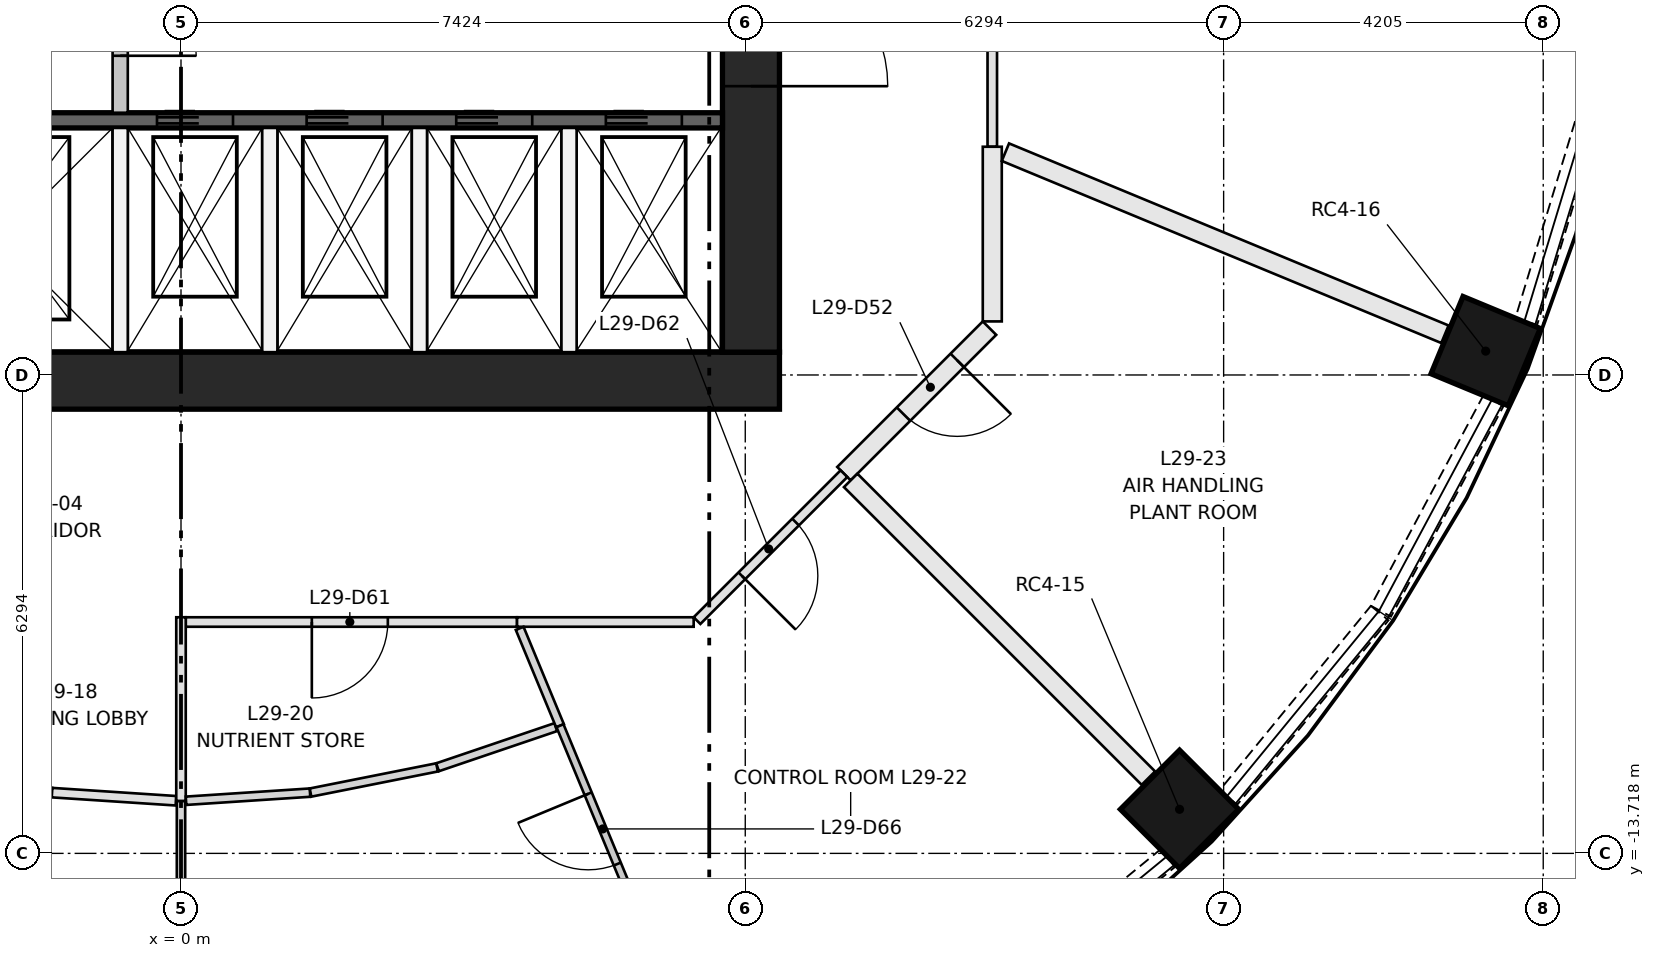
"""IFC4 building model, lengths in metres.
Left out: names, types, materials, properties, quantities, classifications, styles, units other than length and angle.
Written with IfcOpenShell. Run it as: python <this file> out.ifc"""

import sys

from ifc_helpers import new_model, si_unit, direction, frame, frame_2d, origin, origin_2d, place, context, subcontext, project, spatial, rectangle, extrude, element, fill, save


model = new_model("IFC4")
c1 = context("Model", 3, precision=1e-05, world=origin(), true_north=direction((0.0, 1.0)))
c2 = subcontext(c1, "Body", "Model", "MODEL_VIEW")
j1 = project(units=[si_unit("LENGTHUNIT", "METRE"), si_unit("PLANEANGLEUNIT", "RADIAN")], contexts=[c1])
p1 = place(None, origin())
s1 = spatial("IfcSite", under=j1, at=p1, CompositionType="ELEMENT")
p2 = place(p1, origin())
s2 = spatial("IfcBuilding", under=s1, at=p2, CompositionType="ELEMENT")
p3 = place(p2, frame((0.0, 0.0, 112.9)))
s3 = spatial("IfcBuildingStorey", under=s2, at=p3, CompositionType="ELEMENT", Elevation=112.9)
for number, where, z_axis, x_axis in (
    (1, (13.138, -13.138, 0.0), (0.0, 0.0, 1.0), (0.707, -0.707, 0.0)),
    (2, (17.166, -7.11, 0.0), (0.0, 0.0, 1.0), (0.924, -0.383, 0.0)),
):
    element("IfcColumn", number, at=place(p3, frame(where, z_axis=z_axis, x_axis=x_axis)), inside=s3, PredefinedType="COLUMN", context=c2, shape_type="SweptSolid", body=[
        extrude(rectangle(XDim=1.1, YDim=1.1, at=origin_2d()), origin(), (0.0, 0.0, 1.0), 3.65),
    ])
p4 = place(p3, frame((-7.874, -7.499, 0.0), z_axis=(0.0, 0.0, 1.0), x_axis=(1.0, 0.0, 0.0)))
e3 = element("IfcWall", 3, at=p4, inside=s3, PredefinedType="SHEAR", context=c2, shape_type="SweptSolid", body=[
    extrude(rectangle(XDim=15.748, YDim=0.75, at=frame_2d((7.874, 0.0))), origin(), (0.0, 0.0, 1.0), 3.65),
])
p5 = place(p3, frame((7.499, -7.124, 0.0), z_axis=(0.0, 0.0, 1.0), x_axis=(0.0, 1.0, 0.0)))
e4 = element("IfcWall", 4, at=p5, inside=s3, PredefinedType="SHEAR", context=c2, shape_type="SweptSolid", body=[
    extrude(rectangle(XDim=14.248, YDim=0.75, at=frame_2d((7.124, 0.0))), origin(), (0.0, 0.0, 1.0), 3.65),
])
p6 = place(p5, frame((6.624, 0.0, 0.0)))
e5 = element("IfcOpeningElement", 5, at=p6, cuts=e4, PredefinedType="OPENING", context=c2, shape_type="SweptSolid", body=[
    extrude(rectangle(XDim=1.0, YDim=2.1, at=frame_2d((0.5, 1.05))), frame((0.0, 0.385, 0.0), z_axis=(0.0, -1.0, 0.0), x_axis=(1.0, 0.0, 0.0)), (0.0, 0.0, 1.0), 0.77),
])
p7 = place(p5, frame((3.5, 0.0, 0.0)))
e6 = element("IfcOpeningElement", 6, at=p7, cuts=e4, PredefinedType="OPENING", context=c2, shape_type="SweptSolid", body=[
    extrude(rectangle(XDim=1.8, YDim=2.1, at=frame_2d((0.9, 1.05))), frame((0.0, 0.385, 0.0), z_axis=(0.0, -1.0, 0.0), x_axis=(1.0, 0.0, 0.0)), (0.0, 0.0, 1.0), 0.77),
])
p8 = place(p5, frame((8.948, 0.0, 0.0)))
e7 = element("IfcOpeningElement", 7, at=p8, cuts=e4, PredefinedType="OPENING", context=c2, shape_type="SweptSolid", body=[
    extrude(rectangle(XDim=1.8, YDim=2.1, at=frame_2d((0.9, 1.05))), frame((0.0, 0.385, 0.0), z_axis=(0.0, -1.0, 0.0), x_axis=(1.0, 0.0, 0.0)), (0.0, 0.0, 1.0), 0.77),
])
p9 = place(p3, frame((-7.124, -4.074, 0.0), z_axis=(0.0, 0.0, 1.0), x_axis=(1.0, 0.0, 0.0)))
e8 = element("IfcWall", 8, at=p9, inside=s3, PredefinedType="SHEAR", context=c2, shape_type="SweptSolid", body=[
    extrude(rectangle(XDim=14.248, YDim=0.2, at=frame_2d((7.124, 0.0))), origin(), (0.0, 0.0, 1.0), 3.3),
])
p10 = place(p9, frame((1.069, 0.0, 0.0)))
e9 = element("IfcOpeningElement", 9, at=p10, cuts=e8, PredefinedType="OPENING", context=c2, shape_type="SweptSolid", body=[
    extrude(rectangle(XDim=1.1, YDim=2.1, at=frame_2d((0.55, 1.05))), frame((0.0, 0.11, 0.0), z_axis=(0.0, -1.0, 0.0), x_axis=(1.0, 0.0, 0.0)), (0.0, 0.0, 1.0), 0.22),
])
p11 = place(p9, frame((4.206, 0.0, 0.0)))
e10 = element("IfcOpeningElement", 10, at=p11, cuts=e8, PredefinedType="OPENING", context=c2, shape_type="SweptSolid", body=[
    extrude(rectangle(XDim=1.1, YDim=2.1, at=frame_2d((0.55, 1.05))), frame((0.0, 0.11, 0.0), z_axis=(0.0, -1.0, 0.0), x_axis=(1.0, 0.0, 0.0)), (0.0, 0.0, 1.0), 0.22),
])
p12 = place(p9, frame((6.808, 0.0, 0.0)))
e11 = element("IfcOpeningElement", 11, at=p12, cuts=e8, PredefinedType="OPENING", context=c2, shape_type="SweptSolid", body=[
    extrude(rectangle(XDim=1.0, YDim=2.1, at=frame_2d((0.5, 1.05))), frame((0.0, 0.11, 0.0), z_axis=(0.0, -1.0, 0.0), x_axis=(1.0, 0.0, 0.0)), (0.0, 0.0, 1.0), 0.22),
])
p13 = place(p9, frame((8.777, 0.0, 0.0)))
e12 = element("IfcOpeningElement", 12, at=p13, cuts=e8, PredefinedType="OPENING", context=c2, shape_type="SweptSolid", body=[
    extrude(rectangle(XDim=1.0, YDim=2.1, at=frame_2d((0.5, 1.05))), frame((0.0, 0.11, 0.0), z_axis=(0.0, -1.0, 0.0), x_axis=(1.0, 0.0, 0.0)), (0.0, 0.0, 1.0), 0.22),
])
p14 = place(p9, frame((10.745, 0.0, 0.0)))
e13 = element("IfcOpeningElement", 13, at=p14, cuts=e8, PredefinedType="OPENING", context=c2, shape_type="SweptSolid", body=[
    extrude(rectangle(XDim=1.0, YDim=2.1, at=frame_2d((0.5, 1.05))), frame((0.0, 0.11, 0.0), z_axis=(0.0, -1.0, 0.0), x_axis=(1.0, 0.0, 0.0)), (0.0, 0.0, 1.0), 0.22),
])
p15 = place(p9, frame((12.714, 0.0, 0.0)))
e14 = element("IfcOpeningElement", 14, at=p15, cuts=e8, PredefinedType="OPENING", context=c2, shape_type="SweptSolid", body=[
    extrude(rectangle(XDim=1.0, YDim=2.1, at=frame_2d((0.5, 1.05))), frame((0.0, 0.11, 0.0), z_axis=(0.0, -1.0, 0.0), x_axis=(1.0, 0.0, 0.0)), (0.0, 0.0, 1.0), 0.22),
])
p16 = place(p3, frame((-0.8, -7.124, 0.0), z_axis=(0.0, 0.0, 1.0), x_axis=(0.0, 1.0, 0.0)))
e15 = element("IfcWall", 15, at=p16, inside=s3, PredefinedType="PARTITIONING", context=c2, shape_type="SweptSolid", body=[
    extrude(rectangle(XDim=2.95, YDim=0.2, at=frame_2d((1.475, 0.0))), origin(), (0.0, 0.0, 1.0), 3.3),
])
p17 = place(p3, frame((-0.8, -3.974, 0.0), z_axis=(0.0, 0.0, 1.0), x_axis=(0.0, 1.0, 0.0)))
e16 = element("IfcWall", 16, at=p17, inside=s3, PredefinedType="PARTITIONING", context=c2, shape_type="SweptSolid", body=[
    extrude(rectangle(XDim=2.499, YDim=0.2, at=frame_2d((1.25, 0.0))), origin(), (0.0, 0.0, 1.0), 3.3),
])
p18 = place(p17, frame((0.75, 0.0, 0.0)))
e17 = element("IfcOpeningElement", 17, at=p18, cuts=e16, PredefinedType="OPENING", context=c2, shape_type="SweptSolid", body=[
    extrude(rectangle(XDim=1.0, YDim=2.1, at=frame_2d((0.5, 1.05))), frame((0.0, 0.11, 0.0), z_axis=(0.0, -1.0, 0.0), x_axis=(1.0, 0.0, 0.0)), (0.0, 0.0, 1.0), 0.22),
])
for number, where, z_axis, x_axis in (
    (18, (1.168, -7.124, 0.0), (0.0, 0.0, 1.0), (0.0, 1.0, 0.0)),
    (19, (3.137, -7.124, 0.0), (0.0, 0.0, 1.0), (0.0, 1.0, 0.0)),
    (20, (5.105, -7.124, 0.0), (0.0, 0.0, 1.0), (0.0, 1.0, 0.0)),
):
    element("IfcWall", number, at=place(p3, frame(where, z_axis=z_axis, x_axis=x_axis)), inside=s3, PredefinedType="PARTITIONING", context=c2, shape_type="SweptSolid", body=[
        extrude(rectangle(XDim=2.95, YDim=0.2, at=frame_2d((1.475, 0.0))), origin(), (0.0, 0.0, 1.0), 3.3),
    ])
for number, where, z_axis, x_axis in (
    (21, (10.557, -15.771, 0.0), (0.0, 0.0, 1.0), (0.773, 0.634, 0.0)),
    (22, (13.781, -12.983, 0.0), (0.0, 0.0, 1.0), (0.634, 0.773, 0.0)),
):
    element("IfcWall", number, at=place(p3, frame(where, z_axis=z_axis, x_axis=x_axis)), inside=s3, PredefinedType="SOLIDWALL", context=c2, shape_type="SweptSolid", body=[
        extrude(rectangle(XDim=3.139, YDim=0.3, at=frame_2d((1.569, 0.0))), origin(), (0.0, 0.0, 1.0), 0.9),
    ])
p19 = place(p3, frame((15.788, -10.532, 0.0), z_axis=(0.0, 0.0, 1.0), x_axis=(0.471375185282, 0.88193278355, 0.0)))
e23 = element("IfcWall", 23, at=p19, inside=s3, PredefinedType="SOLIDWALL", context=c2, shape_type="SweptSolid", body=[
    extrude(rectangle(XDim=3.139, YDim=0.3, at=frame_2d((1.57, 0.0))), origin(), (0.0, 0.0, 1.0), 0.9),
])
p20 = place(p3, frame((17.699, -6.722, 0.0), z_axis=(0.0, 0.0, 1.0), x_axis=(0.290214584271, 0.956961595403, 0.0)))
e24 = element("IfcWall", 24, at=p20, inside=s3, PredefinedType="SOLIDWALL", context=c2, shape_type="SweptSolid", body=[
    extrude(rectangle(XDim=3.139, YDim=0.3, at=frame_2d((1.57, 0.0))), origin(), (0.0, 0.0, 1.0), 0.9),
])
p21 = place(p3, frame((10.674, 4.421, 0.0), z_axis=(0.0, 0.0, 1.0), x_axis=(0.0, -1.0, 0.0)))
e25 = element("IfcWall", 25, at=p21, inside=s3, PredefinedType="PARTITIONING", context=c2, shape_type="SweptSolid", body=[
    extrude(rectangle(XDim=8.843, YDim=0.125, at=frame_2d((4.421, 0.0))), origin(), (0.0, 0.0, 1.0), 3.3),
])
p22 = place(p21, frame((3.5, 0.0, 0.0)))
e26 = element("IfcOpeningElement", 26, at=p22, cuts=e25, PredefinedType="OPENING", context=c2, shape_type="SweptSolid", body=[
    extrude(rectangle(XDim=1.8, YDim=2.1, at=frame_2d((0.9, 1.05))), frame((0.0, 0.073, 0.0), z_axis=(0.0, -1.0, 0.0), x_axis=(1.0, 0.0, 0.0)), (0.0, 0.0, 1.0), 0.145),
])
p23 = place(p3, frame((10.637, -6.808, 0.0), z_axis=(0.0, 0.0, 1.0), x_axis=(-0.707151855722, -0.707061703777, 0.0)))
e27 = element("IfcWall", 27, at=p23, inside=s3, PredefinedType="PARTITIONING", context=c2, shape_type="SweptSolid", body=[
    extrude(rectangle(XDim=2.708, YDim=0.25, at=frame_2d((1.354, 0.0))), origin(), (0.0, 0.0, 1.0), 3.3),
])
p24 = place(p23, frame((0.6, 0.0, 0.0)))
e28 = element("IfcOpeningElement", 28, at=p24, cuts=e27, PredefinedType="OPENING", context=c2, shape_type="SweptSolid", body=[
    extrude(rectangle(XDim=1.0, YDim=2.1, at=frame_2d((0.5, 1.05))), frame((0.0, 0.135, 0.0), z_axis=(0.0, -1.0, 0.0), x_axis=(1.0, 0.0, 0.0)), (0.0, 0.0, 1.0), 0.27),
])
p25 = place(p3, frame((10.674, -4.421, 0.0), z_axis=(0.0, 0.0, 1.0), x_axis=(0.0, -1.0, 0.0)))
e29 = element("IfcWall", 29, at=p25, inside=s3, PredefinedType="PARTITIONING", context=c2, shape_type="SweptSolid", body=[
    extrude(rectangle(XDim=2.298, YDim=0.25, at=frame_2d((1.149, 0.0))), origin(), (0.0, 0.0, 1.0), 3.3),
])
p26 = place(p3, frame((4.421, -10.674, 0.0), z_axis=(0.0, 0.0, 1.0), x_axis=(-1.0, 0.0, 0.0)))
e30 = element("IfcWall", 30, at=p26, inside=s3, PredefinedType="PARTITIONING", context=c2, shape_type="SweptSolid", body=[
    extrude(rectangle(XDim=4.359, YDim=0.125, at=frame_2d((2.179, 0.0))), origin(), (0.0, 0.0, 1.0), 3.3),
])
p27 = place(p26, frame((1.7, 0.0, 0.0)))
e31 = element("IfcOpeningElement", 31, at=p27, cuts=e30, PredefinedType="OPENING", context=c2, shape_type="SweptSolid", body=[
    extrude(rectangle(XDim=1.0, YDim=2.1, at=frame_2d((0.5, 1.05))), frame((0.0, 0.073, 0.0), z_axis=(0.0, -1.0, 0.0), x_axis=(1.0, 0.0, 0.0)), (0.0, 0.0, 1.0), 0.145),
])
p28 = place(p3, frame((6.745, -10.674, 0.0), z_axis=(0.0, 0.0, 1.0), x_axis=(-1.0, 0.0, 0.0)))
e32 = element("IfcWall", 32, at=p28, inside=s3, PredefinedType="PARTITIONING", context=c2, shape_type="SweptSolid", body=[
    extrude(rectangle(XDim=2.324, YDim=0.125, at=frame_2d((1.162, 0.0))), origin(), (0.0, 0.0, 1.0), 3.3),
])
p29 = place(p3, frame((8.722, -8.722, 0.0), z_axis=(0.0, 0.0, 1.0), x_axis=(-0.707062130741, -0.707151428813, 0.0)))
e33 = element("IfcWall", 33, at=p29, inside=s3, PredefinedType="PARTITIONING", context=c2, shape_type="SweptSolid", body=[
    extrude(rectangle(XDim=2.734, YDim=0.125, at=frame_2d((1.367, 0.0))), origin(), (0.0, 0.0, 1.0), 3.3),
])
p30 = place(p29, frame((0.9, 0.0, 0.0)))
e34 = element("IfcOpeningElement", 34, at=p30, cuts=e33, PredefinedType="OPENING", context=c2, shape_type="SweptSolid", body=[
    extrude(rectangle(XDim=1.0, YDim=2.1, at=frame_2d((0.5, 1.05))), frame((0.0, 0.073, 0.0), z_axis=(0.0, -1.0, 0.0), x_axis=(1.0, 0.0, 0.0)), (0.0, 0.0, 1.0), 0.145),
])
p31 = place(p3, frame((16.63, -6.888, 0.0), z_axis=(0.0, 0.0, 1.0), x_axis=(-0.923891816603, 0.382653774599, 0.0)))
e35 = element("IfcWall", 35, at=p31, inside=s3, PredefinedType="PARTITIONING", context=c2, shape_type="SweptSolid", body=[
    extrude(rectangle(XDim=6.26, YDim=0.25, at=frame_2d((3.13, 0.0))), origin(), (0.0, 0.0, 1.0), 3.3),
])
p32 = place(p3, frame((-1.705, -12.918, 0.0), z_axis=(0.0, 0.0, 1.0), x_axis=(-0.980795988991, 0.195036478586, 0.0)))
e36 = element("IfcWall", 36, at=p32, inside=s3, PredefinedType="PARTITIONING", context=c2, shape_type="SweptSolid", body=[
    extrude(rectangle(XDim=1.696, YDim=0.125, at=frame_2d((0.848, 0.0))), origin(), (0.0, 0.0, 1.0), 3.3),
])
p33 = place(p32, frame((0.3, 0.0, 0.0)))
e37 = element("IfcOpeningElement", 37, at=p33, cuts=e36, PredefinedType="OPENING", context=c2, shape_type="SweptSolid", body=[
    extrude(rectangle(XDim=1.0, YDim=2.1, at=frame_2d((0.5, 1.05))), frame((0.0, 0.073, 0.0), z_axis=(0.0, -1.0, 0.0), x_axis=(1.0, 0.0, 0.0)), (0.0, 0.0, 1.0), 0.145),
])
p34 = place(p3, frame((-0.067, -13.026, 0.0), z_axis=(0.0, 0.0, 1.0), x_axis=(-0.997855349109, 0.065457637099, 0.0)))
e38 = element("IfcWall", 38, at=p34, inside=s3, PredefinedType="PARTITIONING", context=c2, shape_type="SweptSolid", body=[
    extrude(rectangle(XDim=1.634, YDim=0.125, at=frame_2d((0.817, 0.0))), origin(), (0.0, 0.0, 1.0), 3.3),
])
p35 = place(p3, frame((0.0, -10.612, 0.0), z_axis=(0.0, 0.0, 1.0), x_axis=(0.0, -1.0, 0.0)))
e39 = element("IfcWall", 39, at=p35, inside=s3, PredefinedType="PARTITIONING", context=c2, shape_type="SweptSolid", body=[
    extrude(rectangle(XDim=2.418, YDim=0.125, at=frame_2d((1.209, 0.0))), origin(), (0.0, 0.0, 1.0), 3.3),
])
p36 = place(p3, frame((0.0, -13.03, 0.0), z_axis=(0.0, 0.0, 1.0), x_axis=(0.0, -1.0, 0.0)))
e40 = element("IfcWall", 40, at=p36, inside=s3, PredefinedType="PARTITIONING", context=c2, shape_type="SweptSolid", body=[
    extrude(rectangle(XDim=4.97, YDim=0.11, at=frame_2d((2.485, 0.0))), origin(), (0.0, 0.0, 1.0), 3.3),
])
p37 = place(p3, frame((1.697, -12.919, 0.0), z_axis=(0.0, 0.0, 1.0), x_axis=(-0.997857908157, -0.065418614545, 0.0)))
e41 = element("IfcWall", 41, at=p37, inside=s3, PredefinedType="PARTITIONING", context=c2, shape_type="SweptSolid", body=[
    extrude(rectangle(XDim=1.635, YDim=0.11, at=frame_2d((0.817, 0.0))), origin(), (0.0, 0.0, 1.0), 3.3),
])
p38 = place(p3, frame((3.369, -12.587, 0.0), z_axis=(0.0, 0.0, 1.0), x_axis=(-0.980790359024, -0.19506478833, 0.0)))
e42 = element("IfcWall", 42, at=p38, inside=s3, PredefinedType="PARTITIONING", context=c2, shape_type="SweptSolid", body=[
    extrude(rectangle(XDim=1.697, YDim=0.11, at=frame_2d((0.849, 0.0))), origin(), (0.0, 0.0, 1.0), 3.3),
])
p39 = place(p3, frame((4.931, -12.057, 0.0), z_axis=(0.0, 0.0, 1.0), x_axis=(-0.946990007889, -0.321263015235, 0.0)))
e43 = element("IfcWall", 43, at=p39, inside=s3, PredefinedType="PARTITIONING", context=c2, shape_type="SweptSolid", body=[
    extrude(rectangle(XDim=1.642, YDim=0.11, at=frame_2d((0.821, 0.0))), origin(), (0.0, 0.0, 1.0), 3.3),
])
p40 = place(p3, frame((4.456, -10.758, 0.0), z_axis=(0.0, 0.0, 1.0), x_axis=(0.382751066095, -0.923851514803, 0.0)))
e44 = element("IfcWall", 44, at=p40, inside=s3, PredefinedType="PARTITIONING", context=c2, shape_type="SweptSolid", body=[
    extrude(rectangle(XDim=1.386, YDim=0.11, at=frame_2d((0.693, 0.0))), origin(), (0.0, 0.0, 1.0), 3.3),
])
p41 = place(p3, frame((6.888, -16.63, 0.0), z_axis=(0.0, 0.0, 1.0), x_axis=(-0.38266126553, 0.923888714003, 0.0)))
e45 = element("IfcWall", 45, at=p41, inside=s3, PredefinedType="PARTITIONING", context=c2, shape_type="SweptSolid", body=[
    extrude(rectangle(XDim=4.97, YDim=0.1, at=frame_2d((2.485, 0.0))), origin(), (0.0, 0.0, 1.0), 3.3),
])
p42 = place(p41, frame((3.0, 0.0, 0.0)))
e46 = element("IfcOpeningElement", 46, at=p42, cuts=e45, PredefinedType="OPENING", context=c2, shape_type="SweptSolid", body=[
    extrude(rectangle(XDim=1.0, YDim=2.1, at=frame_2d((0.5, 1.05))), frame((0.0, 0.06, 0.0), z_axis=(0.0, -1.0, 0.0), x_axis=(1.0, 0.0, 0.0)), (0.0, 0.0, 1.0), 0.12),
])
p43 = place(p3, frame((8.811, -8.811, 0.0), z_axis=(0.0, 0.0, 1.0), x_axis=(0.707106781187, -0.707106781187, 0.0)))
e47 = element("IfcWall", 47, at=p43, inside=s3, PredefinedType="PARTITIONING", context=c2, shape_type="SweptSolid", body=[
    extrude(rectangle(XDim=5.54, YDim=0.25, at=frame_2d((2.77, 0.0))), origin(), (0.0, 0.0, 1.0), 3.3),
])
p44 = place(p12, origin())
e48 = element("IfcDoor", 48, at=p44, inside=s3, OperationType="DOUBLE_DOOR_SLIDING", PredefinedType="DOOR", context=c2, shape_type="SweptSolid", body=[
    extrude(rectangle(XDim=1.0, YDim=2.1, at=frame_2d((0.5, 1.05))), frame((0.0, 0.025, 0.0), z_axis=(0.0, -1.0, 0.0), x_axis=(1.0, 0.0, 0.0)), (0.0, 0.0, 1.0), 0.05),
])
fill(e11, e48)
p45 = place(p13, origin())
e49 = element("IfcDoor", 49, at=p45, inside=s3, OperationType="DOUBLE_DOOR_SLIDING", PredefinedType="DOOR", context=c2, shape_type="SweptSolid", body=[
    extrude(rectangle(XDim=1.0, YDim=2.1, at=frame_2d((0.5, 1.05))), frame((0.0, 0.025, 0.0), z_axis=(0.0, -1.0, 0.0), x_axis=(1.0, 0.0, 0.0)), (0.0, 0.0, 1.0), 0.05),
])
fill(e12, e49)
p46 = place(p14, origin())
e50 = element("IfcDoor", 50, at=p46, inside=s3, OperationType="DOUBLE_DOOR_SLIDING", PredefinedType="DOOR", context=c2, shape_type="SweptSolid", body=[
    extrude(rectangle(XDim=1.0, YDim=2.1, at=frame_2d((0.5, 1.05))), frame((0.0, 0.025, 0.0), z_axis=(0.0, -1.0, 0.0), x_axis=(1.0, 0.0, 0.0)), (0.0, 0.0, 1.0), 0.05),
])
fill(e13, e50)
p47 = place(p15, origin())
e51 = element("IfcDoor", 51, at=p47, inside=s3, OperationType="DOUBLE_DOOR_SLIDING", PredefinedType="DOOR", context=c2, shape_type="SweptSolid", body=[
    extrude(rectangle(XDim=1.0, YDim=2.1, at=frame_2d((0.5, 1.05))), frame((0.0, 0.025, 0.0), z_axis=(0.0, -1.0, 0.0), x_axis=(1.0, 0.0, 0.0)), (0.0, 0.0, 1.0), 0.05),
])
fill(e14, e51)
p48 = place(p18, frame((1.0, 0.0, 0.0), z_axis=(0.0, 0.0, 1.0), x_axis=(-1.0, 0.0, 0.0)))
e52 = element("IfcDoor", 52, at=p48, inside=s3, OperationType="SINGLE_SWING_LEFT", PredefinedType="DOOR", context=c2, shape_type="SweptSolid", body=[
    extrude(rectangle(XDim=1.0, YDim=2.1, at=frame_2d((0.5, 1.05))), frame((0.0, 0.025, 0.0), z_axis=(0.0, -1.0, 0.0), x_axis=(1.0, 0.0, 0.0)), (0.0, 0.0, 1.0), 0.05),
])
fill(e17, e52)
p49 = place(p7, frame((1.8, 0.0, 0.0), z_axis=(0.0, 0.0, 1.0), x_axis=(-1.0, 0.0, 0.0)))
e53 = element("IfcDoor", 53, at=p49, inside=s3, OperationType="DOUBLE_DOOR_SINGLE_SWING", PredefinedType="DOOR", context=c2, shape_type="SweptSolid", body=[
    extrude(rectangle(XDim=1.8, YDim=2.1, at=frame_2d((0.9, 1.05))), frame((0.0, 0.025, 0.0), z_axis=(0.0, -1.0, 0.0), x_axis=(1.0, 0.0, 0.0)), (0.0, 0.0, 1.0), 0.05),
])
fill(e6, e53)
p50 = place(p24, origin())
e54 = element("IfcDoor", 54, at=p50, inside=s3, OperationType="SINGLE_SWING_LEFT", PredefinedType="DOOR", context=c2, shape_type="SweptSolid", body=[
    extrude(rectangle(XDim=1.0, YDim=2.1, at=frame_2d((0.5, 1.05))), frame((0.0, 0.025, 0.0), z_axis=(0.0, -1.0, 0.0), x_axis=(1.0, 0.0, 0.0)), (0.0, 0.0, 1.0), 0.05),
])
fill(e28, e54)
p51 = place(p27, origin())
e55 = element("IfcDoor", 55, at=p51, inside=s3, OperationType="SINGLE_SWING_RIGHT", PredefinedType="DOOR", context=c2, shape_type="SweptSolid", body=[
    extrude(rectangle(XDim=1.0, YDim=2.1, at=frame_2d((0.5, 1.05))), frame((0.0, 0.025, 0.0), z_axis=(0.0, -1.0, 0.0), x_axis=(1.0, 0.0, 0.0)), (0.0, 0.0, 1.0), 0.05),
])
fill(e31, e55)
p52 = place(p30, origin())
e56 = element("IfcDoor", 56, at=p52, inside=s3, OperationType="SINGLE_SWING_RIGHT", PredefinedType="DOOR", context=c2, shape_type="SweptSolid", body=[
    extrude(rectangle(XDim=1.0, YDim=2.1, at=frame_2d((0.5, 1.05))), frame((0.0, 0.025, 0.0), z_axis=(0.0, -1.0, 0.0), x_axis=(1.0, 0.0, 0.0)), (0.0, 0.0, 1.0), 0.05),
])
fill(e34, e56)
p53 = place(p42, origin())
e57 = element("IfcDoor", 57, at=p53, inside=s3, OperationType="SINGLE_SWING_RIGHT", PredefinedType="DOOR", context=c2, shape_type="SweptSolid", body=[
    extrude(rectangle(XDim=1.0, YDim=2.1, at=frame_2d((0.5, 1.05))), frame((0.0, 0.025, 0.0), z_axis=(0.0, -1.0, 0.0), x_axis=(1.0, 0.0, 0.0)), (0.0, 0.0, 1.0), 0.05),
])
fill(e46, e57)
save(model, sys.argv[1])
